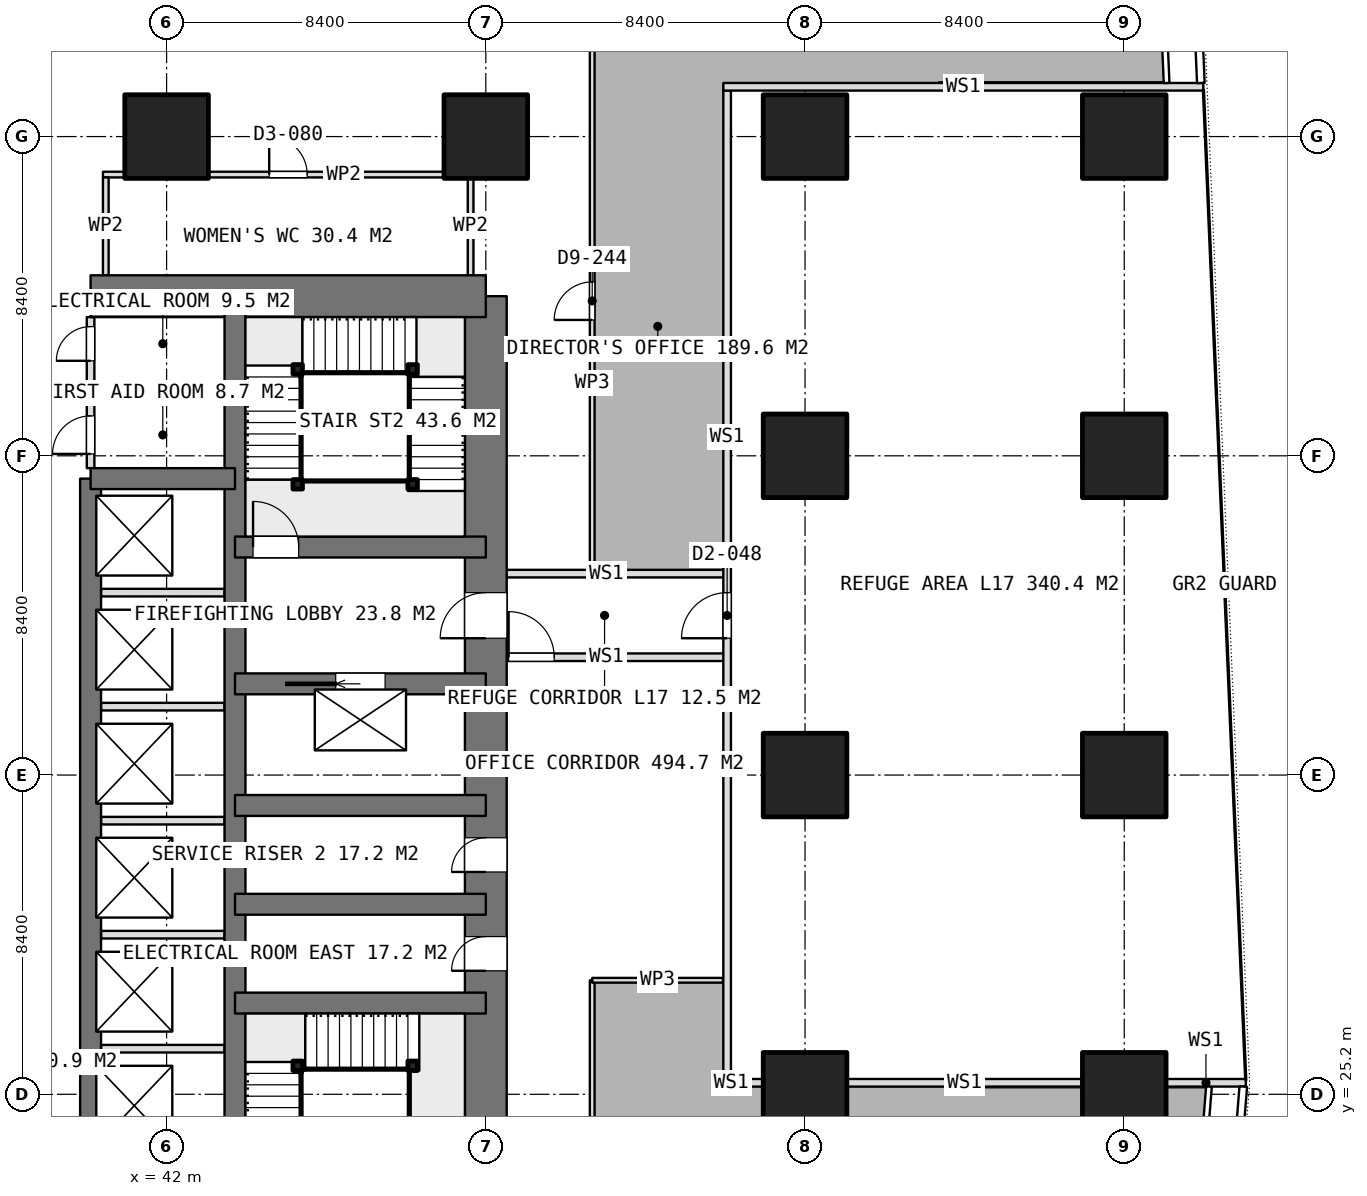
"""IFC4 building model, lengths in metres.
Left out: names, types, materials, properties, quantities, classifications, styles, units other than length and angle.
Written with IfcOpenShell. Run it as: python <this file> out.ifc"""

import sys

from ifc_helpers import new_model, si_unit, direction, frame, frame_2d, origin, origin_2d, place, context, subcontext, project, spatial, rectangle, extrude, element, fill, save


model = new_model("IFC4")
c1 = context("Model", 3, precision=1e-05, world=origin(), true_north=direction((0.0, 1.0)))
c2 = subcontext(c1, "Body", "Model", "MODEL_VIEW")
j1 = project(units=[si_unit("LENGTHUNIT", "METRE"), si_unit("PLANEANGLEUNIT", "RADIAN")], contexts=[c1])
p1 = place(None, origin())
s1 = spatial("IfcSite", under=j1, at=p1, CompositionType="ELEMENT")
p2 = place(p1, origin())
s2 = spatial("IfcBuilding", under=s1, at=p2, CompositionType="ELEMENT")
p3 = place(p2, frame((0.0, 0.0, 70.4)))
s3 = spatial("IfcBuildingStorey", under=s2, at=p3, CompositionType="ELEMENT", Elevation=70.4)
p4 = place(p3, frame((40.0, 46.2, 0.0), z_axis=(0.0, 0.0, 1.0), x_axis=(1.0, 0.0, 0.0)))
e1 = element("IfcWall", 1, at=p4, inside=s3, PredefinedType="SHEAR", context=c2, shape_type="SweptSolid", body=[
    extrude(rectangle(XDim=10.4, YDim=1.1, at=frame_2d((5.2, 0.0))), origin(), (0.0, 0.0, 1.0), 3.75),
])
p5 = place(p3, frame((50.4, 21.0, 0.0), z_axis=(0.0, 0.0, 1.0), x_axis=(0.0, 1.0, 0.0)))
e2 = element("IfcWall", 2, at=p5, inside=s3, PredefinedType="SHEAR", context=c2, shape_type="SweptSolid", body=[
    extrude(rectangle(XDim=25.2, YDim=1.1, at=frame_2d((12.6, 0.0))), origin(), (0.0, 0.0, 1.0), 3.75),
])
p6 = place(p5, frame((16.2, 0.0, 0.0)))
e3 = element("IfcOpeningElement", 3, at=p6, cuts=e2, PredefinedType="OPENING", context=c2, shape_type="SweptSolid", body=[
    extrude(rectangle(XDim=1.2, YDim=2.1, at=frame_2d((0.6, 1.05))), frame((0.0, 0.56, 0.0), z_axis=(0.0, -1.0, 0.0), x_axis=(1.0, 0.0, 0.0)), (0.0, 0.0, 1.0), 1.12),
])
p7 = place(p5, frame((10.05, 0.0, 0.0)))
e4 = element("IfcOpeningElement", 4, at=p7, cuts=e2, PredefinedType="OPENING", context=c2, shape_type="SweptSolid", body=[
    extrude(rectangle(XDim=0.9, YDim=2.1, at=frame_2d((0.45, 1.05))), frame((0.0, 0.56, 0.0), z_axis=(0.0, -1.0, 0.0), x_axis=(1.0, 0.0, 0.0)), (0.0, 0.0, 1.0), 1.12),
])
p8 = place(p5, frame((7.45, 0.0, 0.0)))
e5 = element("IfcOpeningElement", 5, at=p8, cuts=e2, PredefinedType="OPENING", context=c2, shape_type="SweptSolid", body=[
    extrude(rectangle(XDim=0.9, YDim=2.1, at=frame_2d((0.45, 1.05))), frame((0.0, 0.56, 0.0), z_axis=(0.0, -1.0, 0.0), x_axis=(1.0, 0.0, 0.0)), (0.0, 0.0, 1.0), 1.12),
])
p9 = place(p5, frame((0.75, 0.0, 0.0)))
e6 = element("IfcOpeningElement", 6, at=p9, cuts=e2, PredefinedType="OPENING", context=c2, shape_type="SweptSolid", body=[
    extrude(rectangle(XDim=1.2, YDim=2.1, at=frame_2d((0.6, 1.05))), frame((0.0, 0.56, 0.0), z_axis=(0.0, -1.0, 0.0), x_axis=(1.0, 0.0, 0.0)), (0.0, 0.0, 1.0), 1.12),
])
p10 = place(p3, frame((43.8, 21.0, 0.0), z_axis=(0.0, 0.0, 1.0), x_axis=(0.0, 1.0, 0.0)))
e7 = element("IfcWall", 7, at=p10, inside=s3, PredefinedType="SHEAR", context=c2, shape_type="SweptSolid", body=[
    extrude(rectangle(XDim=25.2, YDim=0.55, at=frame_2d((12.6, 0.0))), origin(), (0.0, 0.0, 1.0), 3.75),
])
p11 = place(p3, frame((40.0, 23.4, 0.0), z_axis=(0.0, 0.0, 1.0), x_axis=(0.0, 1.0, 0.0)))
e8 = element("IfcWall", 8, at=p11, inside=s3, PredefinedType="SHEAR", context=c2, shape_type="SweptSolid", body=[
    extrude(rectangle(XDim=18.0, YDim=0.55, at=frame_2d((9.0, 0.0))), origin(), (0.0, 0.0, 1.0), 3.75),
])
p12 = place(p3, frame((40.0, 41.4, 0.0), z_axis=(0.0, 0.0, 1.0), x_axis=(1.0, 0.0, 0.0)))
e9 = element("IfcWall", 9, at=p12, inside=s3, PredefinedType="SHEAR", context=c2, shape_type="SweptSolid", body=[
    extrude(rectangle(XDim=3.8, YDim=0.55, at=frame_2d((1.9, 0.0))), origin(), (0.0, 0.0, 1.0), 3.75),
])
for number, where, z_axis, x_axis in (
    (10, (43.8, 27.6, 0.0), (0.0, 0.0, 1.0), (1.0, 0.0, 0.0)),
    (11, (43.8, 30.2, 0.0), (0.0, 0.0, 1.0), (1.0, 0.0, 0.0)),
    (12, (43.8, 32.8, 0.0), (0.0, 0.0, 1.0), (1.0, 0.0, 0.0)),
):
    element("IfcWall", number, at=place(p3, frame(where, z_axis=z_axis, x_axis=x_axis)), inside=s3, PredefinedType="SHEAR", context=c2, shape_type="SweptSolid", body=[
        extrude(rectangle(XDim=6.6, YDim=0.55, at=frame_2d((3.3, 0.0))), origin(), (0.0, 0.0, 1.0), 3.75),
    ])
p13 = place(p3, frame((43.8, 36.0, 0.0), z_axis=(0.0, 0.0, 1.0), x_axis=(1.0, 0.0, 0.0)))
e13 = element("IfcWall", 13, at=p13, inside=s3, PredefinedType="SHEAR", context=c2, shape_type="SweptSolid", body=[
    extrude(rectangle(XDim=6.6, YDim=0.55, at=frame_2d((3.3, 0.0))), origin(), (0.0, 0.0, 1.0), 3.75),
])
p14 = place(p13, frame((2.65, 0.0, 0.0)))
e14 = element("IfcOpeningElement", 14, at=p14, cuts=e13, PredefinedType="OPENING", context=c2, shape_type="SweptSolid", body=[
    extrude(rectangle(XDim=1.3, YDim=2.1, at=frame_2d((0.65, 1.05))), frame((0.0, 0.285, 0.0), z_axis=(0.0, -1.0, 0.0), x_axis=(1.0, 0.0, 0.0)), (0.0, 0.0, 1.0), 0.57),
])
p15 = place(p3, frame((43.8, 39.6, 0.0), z_axis=(0.0, 0.0, 1.0), x_axis=(1.0, 0.0, 0.0)))
e15 = element("IfcWall", 15, at=p15, inside=s3, PredefinedType="SHEAR", context=c2, shape_type="SweptSolid", body=[
    extrude(rectangle(XDim=6.6, YDim=0.55, at=frame_2d((3.3, 0.0))), origin(), (0.0, 0.0, 1.0), 3.75),
])
p16 = place(p15, frame((0.475, 0.0, 0.0)))
e16 = element("IfcOpeningElement", 16, at=p16, cuts=e15, PredefinedType="OPENING", context=c2, shape_type="SweptSolid", body=[
    extrude(rectangle(XDim=1.2, YDim=2.1, at=frame_2d((0.6, 1.05))), frame((0.0, 0.285, 0.0), z_axis=(0.0, -1.0, 0.0), x_axis=(1.0, 0.0, 0.0)), (0.0, 0.0, 1.0), 0.57),
])
for number, where, z_axis, x_axis in (
    (17, (42.0, 50.4, 0.0), (0.0, 0.0, 1.0), (1.0, 0.0, 0.0)),
    (18, (50.4, 50.4, 0.0), (0.0, 0.0, 1.0), (1.0, 0.0, 0.0)),
    (19, (58.8, 25.2, 0.0), (0.0, 0.0, 1.0), (1.0, 0.0, 0.0)),
    (20, (58.8, 33.6, 0.0), (0.0, 0.0, 1.0), (1.0, 0.0, 0.0)),
    (21, (58.8, 42.0, 0.0), (0.0, 0.0, 1.0), (1.0, 0.0, 0.0)),
    (22, (58.8, 50.4, 0.0), (0.0, 0.0, 1.0), (1.0, 0.0, 0.0)),
    (23, (67.2, 25.2, 0.0), (0.0, 0.0, 1.0), (1.0, 0.0, 0.0)),
    (24, (67.2, 33.6, 0.0), (0.0, 0.0, 1.0), (1.0, 0.0, 0.0)),
    (25, (67.2, 42.0, 0.0), (0.0, 0.0, 1.0), (1.0, 0.0, 0.0)),
    (26, (67.2, 50.4, 0.0), (0.0, 0.0, 1.0), (1.0, 0.0, 0.0)),
):
    element("IfcColumn", number, at=place(p3, frame(where, z_axis=z_axis, x_axis=x_axis)), inside=s3, PredefinedType="COLUMN", context=c2, shape_type="SweptSolid", body=[
        extrude(rectangle(XDim=2.2, YDim=2.2, at=origin_2d()), origin(), (0.0, 0.0, 1.0), 3.75),
    ])
for number, where, z_axis, x_axis in (
    (27, (40.275, 26.4, 0.0), (0.0, 0.0, 1.0), (1.0, 0.0, 0.0)),
    (28, (40.275, 29.4, 0.0), (0.0, 0.0, 1.0), (1.0, 0.0, 0.0)),
    (29, (40.275, 32.4, 0.0), (0.0, 0.0, 1.0), (1.0, 0.0, 0.0)),
    (30, (40.275, 35.4, 0.0), (0.0, 0.0, 1.0), (1.0, 0.0, 0.0)),
    (31, (40.275, 38.4, 0.0), (0.0, 0.0, 1.0), (1.0, 0.0, 0.0)),
):
    element("IfcWall", number, at=place(p3, frame(where, z_axis=z_axis, x_axis=x_axis)), inside=s3, PredefinedType="PARTITIONING", context=c2, shape_type="SweptSolid", body=[
        extrude(rectangle(XDim=3.25, YDim=0.2, at=frame_2d((1.625, 0.0))), origin(), (0.0, 0.0, 1.0), 3.5),
    ])
p17 = place(p3, frame((40.0, 41.675, 0.0), z_axis=(0.0, 0.0, 1.0), x_axis=(0.0, 1.0, 0.0)))
e32 = element("IfcWall", 32, at=p17, inside=s3, PredefinedType="PARTITIONING", context=c2, shape_type="SweptSolid", body=[
    extrude(rectangle(XDim=3.975, YDim=0.2, at=frame_2d((1.987, 0.0))), origin(), (0.0, 0.0, 1.0), 3.5),
])
p18 = place(p17, frame((2.825, 0.0, 0.0)))
e33 = element("IfcOpeningElement", 33, at=p18, cuts=e32, PredefinedType="OPENING", context=c2, shape_type="SweptSolid", body=[
    extrude(rectangle(XDim=0.9, YDim=2.1, at=frame_2d((0.45, 1.05))), frame((0.0, 0.11, 0.0), z_axis=(0.0, -1.0, 0.0), x_axis=(1.0, 0.0, 0.0)), (0.0, 0.0, 1.0), 0.22),
])
p19 = place(p17, frame((0.375, 0.0, 0.0)))
e34 = element("IfcOpeningElement", 34, at=p19, cuts=e32, PredefinedType="OPENING", context=c2, shape_type="SweptSolid", body=[
    extrude(rectangle(XDim=1.0, YDim=2.1, at=frame_2d((0.5, 1.05))), frame((0.0, 0.11, 0.0), z_axis=(0.0, -1.0, 0.0), x_axis=(1.0, 0.0, 0.0)), (0.0, 0.0, 1.0), 0.22),
])
p20 = place(p3, frame((40.0, 43.7, 0.0), z_axis=(0.0, 0.0, 1.0), x_axis=(1.0, 0.0, 0.0)))
e35 = element("IfcWall", 35, at=p20, inside=s3, PredefinedType="PARTITIONING", context=c2, shape_type="SweptSolid", body=[
    extrude(rectangle(XDim=3.525, YDim=0.2, at=frame_2d((1.762, 0.0))), origin(), (0.0, 0.0, 1.0), 3.5),
])
p21 = place(p3, frame((40.325, 49.4, 0.0), z_axis=(0.0, 0.0, 1.0), x_axis=(1.0, 0.0, 0.0)))
e36 = element("IfcWall", 36, at=p21, inside=s3, PredefinedType="PARTITIONING", context=c2, shape_type="SweptSolid", body=[
    extrude(rectangle(XDim=9.75, YDim=0.15, at=frame_2d((4.875, 0.0))), origin(), (0.0, 0.0, 1.0), 3.5),
])
p22 = place(p21, frame((4.375, 0.0, 0.0)))
e37 = element("IfcOpeningElement", 37, at=p22, cuts=e36, PredefinedType="OPENING", context=c2, shape_type="SweptSolid", body=[
    extrude(rectangle(XDim=1.0, YDim=2.1, at=frame_2d((0.5, 1.05))), frame((0.0, 0.085, 0.0), z_axis=(0.0, -1.0, 0.0), x_axis=(1.0, 0.0, 0.0)), (0.0, 0.0, 1.0), 0.17),
])
for number, where, z_axis, x_axis in (
    (38, (40.4, 46.75, 0.0), (0.0, 0.0, 1.0), (0.0, 1.0, 0.0)),
    (39, (50.0, 46.75, 0.0), (0.0, 0.0, 1.0), (0.0, 1.0, 0.0)),
):
    element("IfcWall", number, at=place(p3, frame(where, z_axis=z_axis, x_axis=x_axis)), inside=s3, PredefinedType="PARTITIONING", context=c2, shape_type="SweptSolid", body=[
        extrude(rectangle(XDim=2.575, YDim=0.15, at=frame_2d((1.288, 0.0))), origin(), (0.0, 0.0, 1.0), 3.5),
    ])
p23 = place(p3, frame((53.2, 20.002, 0.0), z_axis=(0.0, 0.0, 1.0), x_axis=(0.0, 1.0, 0.0)))
e40 = element("IfcWall", 40, at=p23, inside=s3, PredefinedType="PARTITIONING", context=c2, shape_type="SweptSolid", body=[
    extrude(rectangle(XDim=8.198, YDim=0.125, at=frame_2d((4.099, 0.0))), origin(), (0.0, 0.0, 1.0), 3.5),
])
p24 = place(p3, frame((53.2, 28.2, 0.0), z_axis=(0.0, 0.0, 1.0), x_axis=(1.0, 0.0, 0.0)))
e41 = element("IfcWall", 41, at=p24, inside=s3, PredefinedType="PARTITIONING", context=c2, shape_type="SweptSolid", body=[
    extrude(rectangle(XDim=3.439, YDim=0.125, at=frame_2d((1.719, 0.0))), origin(), (0.0, 0.0, 1.0), 3.5),
])
p25 = place(p3, frame((53.2, 39.011, 0.0), z_axis=(0.0, 0.0, 1.0), x_axis=(0.0, 1.0, 0.0)))
e42 = element("IfcWall", 42, at=p25, inside=s3, PredefinedType="PARTITIONING", context=c2, shape_type="SweptSolid", body=[
    extrude(rectangle(XDim=13.989, YDim=0.125, at=frame_2d((6.995, 0.0))), origin(), (0.0, 0.0, 1.0), 3.5),
])
p26 = place(p25, frame((6.564, 0.0, 0.0)))
e43 = element("IfcOpeningElement", 43, at=p26, cuts=e42, PredefinedType="OPENING", context=c2, shape_type="SweptSolid", body=[
    extrude(rectangle(XDim=1.0, YDim=2.1, at=frame_2d((0.5, 1.05))), frame((0.0, 0.073, 0.0), z_axis=(0.0, -1.0, 0.0), x_axis=(1.0, 0.0, 0.0)), (0.0, 0.0, 1.0), 0.145),
])
for number, where, z_axis, x_axis in (
    (44, (45.45, 41.25, 0.0), (0.0, 0.0, 1.0), (1.0, 0.0, 0.0)),
    (45, (45.45, 44.275, 0.0), (0.0, 0.0, 1.0), (1.0, 0.0, 0.0)),
    (46, (48.475, 44.275, 0.0), (0.0, 0.0, 1.0), (1.0, 0.0, 0.0)),
    (47, (48.475, 41.25, 0.0), (0.0, 0.0, 1.0), (1.0, 0.0, 0.0)),
    (48, (45.45, 25.95, 0.0), (0.0, 0.0, 1.0), (1.0, 0.0, 0.0)),
    (49, (48.475, 25.95, 0.0), (0.0, 0.0, 1.0), (1.0, 0.0, 0.0)),
):
    element("IfcColumn", number, at=place(p3, frame(where, z_axis=z_axis, x_axis=x_axis)), inside=s3, PredefinedType="COLUMN", context=c2, shape_type="SweptSolid", body=[
        extrude(rectangle(XDim=0.25, YDim=0.25, at=origin_2d()), origin(), (0.0, 0.0, 1.0), 3.75),
    ])
p27 = place(p3, frame((56.75, 25.603, 0.0), z_axis=(0.0, 0.0, 1.0), x_axis=(0.0, 1.0, 0.0)))
e50 = element("IfcWall", 50, at=p27, inside=s3, PredefinedType="PARTITIONING", context=c2, shape_type="SweptSolid", body=[
    extrude(rectangle(XDim=26.007, YDim=0.2, at=frame_2d((13.003, 0.0))), origin(), (0.0, 0.0, 1.0), 3.5),
])
p28 = place(p27, frame((11.597, 0.0, 0.0)))
e51 = element("IfcOpeningElement", 51, at=p28, cuts=e50, PredefinedType="OPENING", context=c2, shape_type="SweptSolid", body=[
    extrude(rectangle(XDim=1.2, YDim=2.1, at=frame_2d((0.6, 1.05))), frame((0.0, 0.11, 0.0), z_axis=(0.0, -1.0, 0.0), x_axis=(1.0, 0.0, 0.0)), (0.0, 0.0, 1.0), 0.22),
])
p29 = place(p3, frame((56.65, 25.503, 0.0), z_axis=(0.0, 0.0, 1.0), x_axis=(1.0, 0.0, 0.0)))
e52 = element("IfcWall", 52, at=p29, inside=s3, PredefinedType="PARTITIONING", context=c2, shape_type="SweptSolid", body=[
    extrude(rectangle(XDim=1.05, YDim=0.2, at=frame_2d((0.525, 0.0))), origin(), (0.0, 0.0, 1.0), 3.5),
])
p30 = place(p3, frame((59.9, 25.503, 0.0), z_axis=(0.0, 0.0, 1.0), x_axis=(1.0, 0.0, 0.0)))
e53 = element("IfcWall", 53, at=p30, inside=s3, PredefinedType="PARTITIONING", context=c2, shape_type="SweptSolid", body=[
    extrude(rectangle(XDim=6.2, YDim=0.2, at=frame_2d((3.1, 0.0))), origin(), (0.0, 0.0, 1.0), 3.5),
])
p31 = place(p3, frame((68.3, 25.503, 0.0), z_axis=(0.0, 0.0, 1.0), x_axis=(1.0, 0.0, 0.0)))
e54 = element("IfcWall", 54, at=p31, inside=s3, PredefinedType="PARTITIONING", context=c2, shape_type="SweptSolid", body=[
    extrude(rectangle(XDim=2.1, YDim=0.2, at=frame_2d((1.05, 0.0))), origin(), (0.0, 0.0, 1.0), 3.5),
])
p32 = place(p3, frame((56.65, 51.71, 0.0), z_axis=(0.0, 0.0, 1.0), x_axis=(1.0, 0.0, 0.0)))
e55 = element("IfcWall", 55, at=p32, inside=s3, PredefinedType="PARTITIONING", context=c2, shape_type="SweptSolid", body=[
    extrude(rectangle(XDim=12.63, YDim=0.2, at=frame_2d((6.315, 0.0))), origin(), (0.0, 0.0, 1.0), 3.5),
])
p33 = place(p3, frame((50.4, 38.9, 0.0), z_axis=(0.0, 0.0, 1.0), x_axis=(1.0, 0.0, 0.0)))
e56 = element("IfcWall", 56, at=p33, inside=s3, PredefinedType="PARTITIONING", context=c2, shape_type="SweptSolid", body=[
    extrude(rectangle(XDim=6.35, YDim=0.2, at=frame_2d((3.175, 0.0))), origin(), (0.0, 0.0, 1.0), 3.5),
])
p34 = place(p3, frame((50.4, 36.7, 0.0), z_axis=(0.0, 0.0, 1.0), x_axis=(1.0, 0.0, 0.0)))
e57 = element("IfcWall", 57, at=p34, inside=s3, PredefinedType="PARTITIONING", context=c2, shape_type="SweptSolid", body=[
    extrude(rectangle(XDim=6.35, YDim=0.2, at=frame_2d((3.175, 0.0))), origin(), (0.0, 0.0, 1.0), 3.5),
])
p35 = place(p34, frame((0.6, 0.0, 0.0)))
e58 = element("IfcOpeningElement", 58, at=p35, cuts=e57, PredefinedType="OPENING", context=c2, shape_type="SweptSolid", body=[
    extrude(rectangle(XDim=1.2, YDim=2.1, at=frame_2d((0.6, 1.05))), frame((0.0, 0.11, 0.0), z_axis=(0.0, -1.0, 0.0), x_axis=(1.0, 0.0, 0.0)), (0.0, 0.0, 1.0), 0.22),
])
p36 = place(p6, origin())
e59 = element("IfcDoor", 59, at=p36, inside=s3, OperationType="SINGLE_SWING_LEFT", PredefinedType="DOOR", context=c2, shape_type="SweptSolid", body=[
    extrude(rectangle(XDim=1.2, YDim=2.1, at=frame_2d((0.6, 1.05))), frame((0.0, 0.025, 0.0), z_axis=(0.0, -1.0, 0.0), x_axis=(1.0, 0.0, 0.0)), (0.0, 0.0, 1.0), 0.05),
])
fill(e3, e59)
p37 = place(p7, origin())
e60 = element("IfcDoor", 60, at=p37, inside=s3, OperationType="SINGLE_SWING_LEFT", PredefinedType="DOOR", context=c2, shape_type="SweptSolid", body=[
    extrude(rectangle(XDim=0.9, YDim=2.1, at=frame_2d((0.45, 1.05))), frame((0.0, 0.025, 0.0), z_axis=(0.0, -1.0, 0.0), x_axis=(1.0, 0.0, 0.0)), (0.0, 0.0, 1.0), 0.05),
])
fill(e4, e60)
p38 = place(p8, origin())
e61 = element("IfcDoor", 61, at=p38, inside=s3, OperationType="SINGLE_SWING_LEFT", PredefinedType="DOOR", context=c2, shape_type="SweptSolid", body=[
    extrude(rectangle(XDim=0.9, YDim=2.1, at=frame_2d((0.45, 1.05))), frame((0.0, 0.025, 0.0), z_axis=(0.0, -1.0, 0.0), x_axis=(1.0, 0.0, 0.0)), (0.0, 0.0, 1.0), 0.05),
])
fill(e5, e61)
p39 = place(p18, origin())
e62 = element("IfcDoor", 62, at=p39, inside=s3, OperationType="SINGLE_SWING_LEFT", PredefinedType="DOOR", context=c2, shape_type="SweptSolid", body=[
    extrude(rectangle(XDim=0.9, YDim=2.1, at=frame_2d((0.45, 1.05))), frame((0.0, 0.025, 0.0), z_axis=(0.0, -1.0, 0.0), x_axis=(1.0, 0.0, 0.0)), (0.0, 0.0, 1.0), 0.05),
])
fill(e33, e62)
p40 = place(p19, origin())
e63 = element("IfcDoor", 63, at=p40, inside=s3, OperationType="SINGLE_SWING_LEFT", PredefinedType="DOOR", context=c2, shape_type="SweptSolid", body=[
    extrude(rectangle(XDim=1.0, YDim=2.1, at=frame_2d((0.5, 1.05))), frame((0.0, 0.025, 0.0), z_axis=(0.0, -1.0, 0.0), x_axis=(1.0, 0.0, 0.0)), (0.0, 0.0, 1.0), 0.05),
])
fill(e34, e63)
p41 = place(p14, origin())
e64 = element("IfcDoor", 64, at=p41, inside=s3, OperationType="SLIDING_TO_LEFT", PredefinedType="USERDEFINED", context=c2, shape_type="SweptSolid", body=[
    extrude(rectangle(XDim=1.3, YDim=2.1, at=frame_2d((0.65, 1.05))), frame((0.0, 0.025, 0.0), z_axis=(0.0, -1.0, 0.0), x_axis=(1.0, 0.0, 0.0)), (0.0, 0.0, 1.0), 0.05),
])
fill(e14, e64)
p42 = place(p22, origin())
e65 = element("IfcDoor", 65, at=p42, inside=s3, OperationType="SINGLE_SWING_LEFT", PredefinedType="DOOR", context=c2, shape_type="SweptSolid", body=[
    extrude(rectangle(XDim=1.0, YDim=2.1, at=frame_2d((0.5, 1.05))), frame((0.0, 0.025, 0.0), z_axis=(0.0, -1.0, 0.0), x_axis=(1.0, 0.0, 0.0)), (0.0, 0.0, 1.0), 0.05),
])
fill(e37, e65)
p43 = place(p26, origin())
e66 = element("IfcDoor", 66, at=p43, inside=s3, OperationType="SINGLE_SWING_LEFT", PredefinedType="DOOR", context=c2, shape_type="SweptSolid", body=[
    extrude(rectangle(XDim=1.0, YDim=2.1, at=frame_2d((0.5, 1.05))), frame((0.0, 0.025, 0.0), z_axis=(0.0, -1.0, 0.0), x_axis=(1.0, 0.0, 0.0)), (0.0, 0.0, 1.0), 0.05),
])
fill(e43, e66)
p44 = place(p16, origin())
e67 = element("IfcDoor", 67, at=p44, inside=s3, OperationType="SINGLE_SWING_RIGHT", PredefinedType="DOOR", context=c2, shape_type="SweptSolid", body=[
    extrude(rectangle(XDim=1.2, YDim=2.1, at=frame_2d((0.6, 1.05))), frame((0.0, 0.025, 0.0), z_axis=(0.0, -1.0, 0.0), x_axis=(1.0, 0.0, 0.0)), (0.0, 0.0, 1.0), 0.05),
])
fill(e16, e67)
p45 = place(p28, origin())
e68 = element("IfcDoor", 68, at=p45, inside=s3, OperationType="SINGLE_SWING_LEFT", PredefinedType="DOOR", context=c2, shape_type="SweptSolid", body=[
    extrude(rectangle(XDim=1.2, YDim=2.1, at=frame_2d((0.6, 1.05))), frame((0.0, 0.025, 0.0), z_axis=(0.0, -1.0, 0.0), x_axis=(1.0, 0.0, 0.0)), (0.0, 0.0, 1.0), 0.05),
])
fill(e51, e68)
p46 = place(p35, origin())
e69 = element("IfcDoor", 69, at=p46, inside=s3, OperationType="SINGLE_SWING_LEFT", PredefinedType="DOOR", context=c2, shape_type="SweptSolid", body=[
    extrude(rectangle(XDim=1.2, YDim=2.1, at=frame_2d((0.6, 1.05))), frame((0.0, 0.025, 0.0), z_axis=(0.0, -1.0, 0.0), x_axis=(1.0, 0.0, 0.0)), (0.0, 0.0, 1.0), 0.05),
])
fill(e58, e69)
save(model, sys.argv[1])
